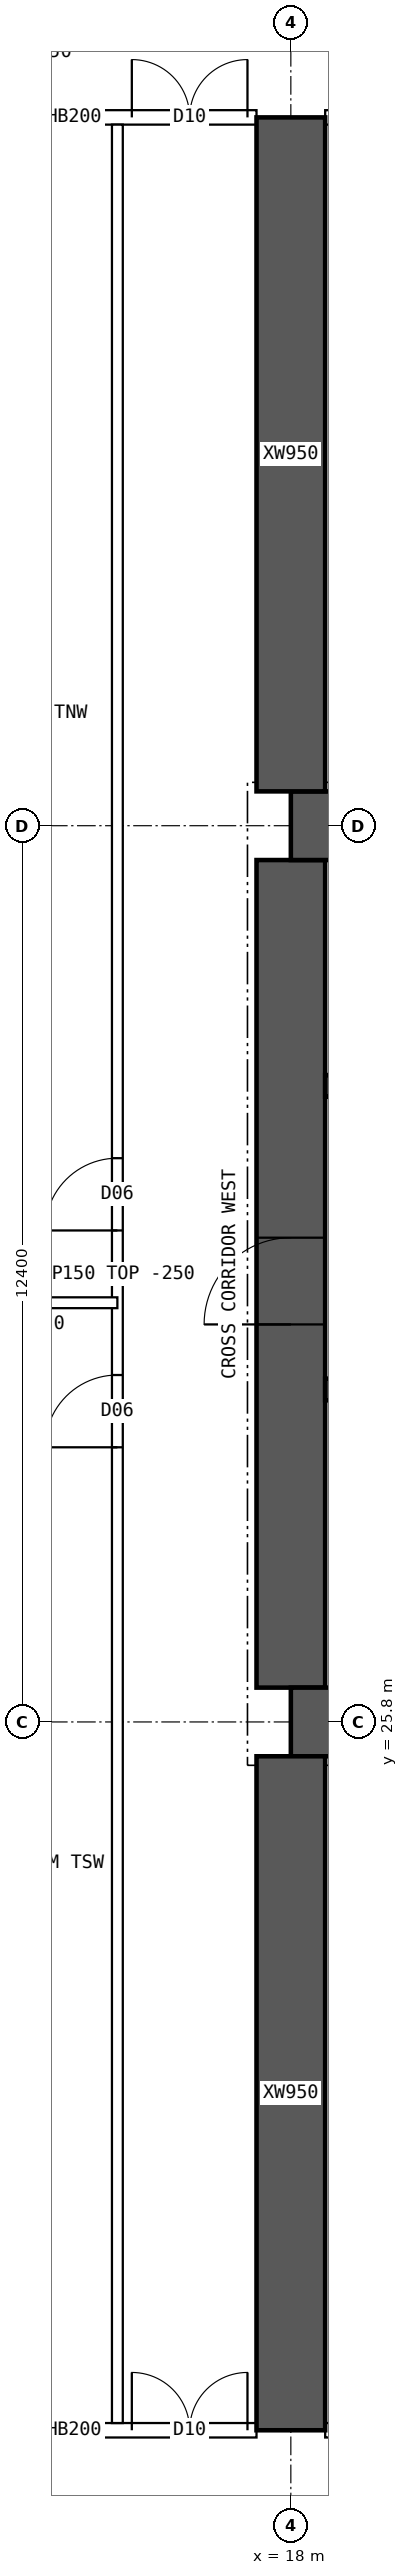
"""IFC4 building model, lengths in metres.
Left out: names, types, materials, properties, quantities, classifications, styles, units other than length and angle.
Written with IfcOpenShell. Run it as: python <this file> out.ifc"""

import sys

from ifc_helpers import new_model, si_unit, direction, frame, frame_2d, origin, place, context, subcontext, project, spatial, rectangle, extrude, element, fill, save


model = new_model("IFC4")
c1 = context("Model", 3, precision=1e-05, world=origin(), true_north=direction((0.0, 1.0)))
c2 = subcontext(c1, "Body", "Model", "MODEL_VIEW")
j1 = project(units=[si_unit("LENGTHUNIT", "METRE"), si_unit("PLANEANGLEUNIT", "RADIAN")], contexts=[c1])
p1 = place(None, origin())
s1 = spatial("IfcSite", under=j1, at=p1, CompositionType="ELEMENT")
p2 = place(p1, origin())
s2 = spatial("IfcBuilding", under=s1, at=p2, CompositionType="ELEMENT")
p3 = place(p2, frame((0.0, 0.0, 106.9)))
s3 = spatial("IfcBuildingStorey", under=s2, at=p3, CompositionType="ELEMENT", Elevation=106.9)
for number, where, z_axis, x_axis in (
    (1, (18.0, 25.8, 0.0), (0.0, 0.0, 1.0), (1.0, 0.0, 0.0)),
    (2, (18.0, 38.2, 0.0), (0.0, 0.0, 1.0), (1.0, 0.0, 0.0)),
):
    element("IfcWall", number, at=place(p3, frame(where, z_axis=z_axis, x_axis=x_axis)), inside=s3, PredefinedType="SHEAR", context=c2, shape_type="SweptSolid", body=[
        extrude(rectangle(XDim=48.0, YDim=0.95, at=frame_2d((24.0, 0.0))), origin(), (0.0, 0.0, 1.0), 3.75),
    ])
p4 = place(p3, frame((18.0, 26.275, 0.0), z_axis=(0.0, 0.0, 1.0), x_axis=(0.0, 1.0, 0.0)))
e3 = element("IfcWall", 3, at=p4, inside=s3, PredefinedType="SHEAR", context=c2, shape_type="SweptSolid", body=[
    extrude(rectangle(XDim=11.45, YDim=0.95, at=frame_2d((5.725, 0.0))), origin(), (0.0, 0.0, 1.0), 3.75),
])
p5 = place(p4, frame((5.025, 0.0, 0.0)))
e4 = element("IfcOpeningElement", 4, at=p5, cuts=e3, PredefinedType="OPENING", context=c2, shape_type="SweptSolid", body=[
    extrude(rectangle(XDim=1.2, YDim=2.1, at=frame_2d((0.6, 1.05))), frame((0.0, 0.485, 0.0), z_axis=(0.0, -1.0, 0.0), x_axis=(1.0, 0.0, 0.0)), (0.0, 0.0, 1.0), 0.97),
])
p6 = place(p3, frame((18.475, 30.4, 0.0), z_axis=(0.0, 0.0, 1.0), x_axis=(1.0, 0.0, 0.0)))
e5 = element("IfcWall", 5, at=p6, inside=s3, PredefinedType="SHEAR", context=c2, shape_type="SweptSolid", body=[
    extrude(rectangle(XDim=47.05, YDim=0.3, at=frame_2d((23.525, 0.0))), origin(), (0.0, 0.0, 1.0), 3.75),
])
p7 = place(p6, frame((0.4, 0.0, 0.0)))
e6 = element("IfcOpeningElement", 6, at=p7, cuts=e5, PredefinedType="OPENING", context=c2, shape_type="SweptSolid", body=[
    extrude(rectangle(XDim=1.0, YDim=2.1, at=frame_2d((0.5, 1.05))), frame((0.0, 0.16, 0.0), z_axis=(0.0, -1.0, 0.0), x_axis=(1.0, 0.0, 0.0)), (0.0, 0.0, 1.0), 0.32),
])
p8 = place(p6, frame((45.65, 0.0, 0.0)))
e7 = element("IfcOpeningElement", 7, at=p8, cuts=e5, PredefinedType="OPENING", context=c2, shape_type="SweptSolid", body=[
    extrude(rectangle(XDim=1.0, YDim=2.1, at=frame_2d((0.5, 1.05))), frame((0.0, 0.16, 0.0), z_axis=(0.0, -1.0, 0.0), x_axis=(1.0, 0.0, 0.0)), (0.0, 0.0, 1.0), 0.32),
])
p9 = place(p6, frame((8.275, 0.0, 0.0)))
e8 = element("IfcOpeningElement", 8, at=p9, cuts=e5, PredefinedType="OPENING", context=c2, shape_type="SweptSolid", body=[
    extrude(rectangle(XDim=1.1, YDim=2.1, at=frame_2d((0.55, 1.05))), frame((0.0, 0.16, 0.0), z_axis=(0.0, -1.0, 0.0), x_axis=(1.0, 0.0, 0.0)), (0.0, 0.0, 1.0), 0.32),
])
p10 = place(p6, frame((10.875, 0.0, 0.0)))
e9 = element("IfcOpeningElement", 9, at=p10, cuts=e5, PredefinedType="OPENING", context=c2, shape_type="SweptSolid", body=[
    extrude(rectangle(XDim=1.1, YDim=2.1, at=frame_2d((0.55, 1.05))), frame((0.0, 0.16, 0.0), z_axis=(0.0, -1.0, 0.0), x_axis=(1.0, 0.0, 0.0)), (0.0, 0.0, 1.0), 0.32),
])
p11 = place(p6, frame((13.475, 0.0, 0.0)))
e10 = element("IfcOpeningElement", 10, at=p11, cuts=e5, PredefinedType="OPENING", context=c2, shape_type="SweptSolid", body=[
    extrude(rectangle(XDim=1.1, YDim=2.1, at=frame_2d((0.55, 1.05))), frame((0.0, 0.16, 0.0), z_axis=(0.0, -1.0, 0.0), x_axis=(1.0, 0.0, 0.0)), (0.0, 0.0, 1.0), 0.32),
])
p12 = place(p6, frame((16.075, 0.0, 0.0)))
e11 = element("IfcOpeningElement", 11, at=p12, cuts=e5, PredefinedType="OPENING", context=c2, shape_type="SweptSolid", body=[
    extrude(rectangle(XDim=1.1, YDim=2.1, at=frame_2d((0.55, 1.05))), frame((0.0, 0.16, 0.0), z_axis=(0.0, -1.0, 0.0), x_axis=(1.0, 0.0, 0.0)), (0.0, 0.0, 1.0), 0.32),
])
p13 = place(p6, frame((18.85, 0.0, 0.0)))
e12 = element("IfcOpeningElement", 12, at=p13, cuts=e5, PredefinedType="OPENING", context=c2, shape_type="SweptSolid", body=[
    extrude(rectangle(XDim=0.9, YDim=2.1, at=frame_2d((0.45, 1.05))), frame((0.0, 0.16, 0.0), z_axis=(0.0, -1.0, 0.0), x_axis=(1.0, 0.0, 0.0)), (0.0, 0.0, 1.0), 0.32),
])
p14 = place(p6, frame((30.142, 0.0, 0.0)))
e13 = element("IfcOpeningElement", 13, at=p14, cuts=e5, PredefinedType="OPENING", context=c2, shape_type="SweptSolid", body=[
    extrude(rectangle(XDim=1.1, YDim=2.1, at=frame_2d((0.55, 1.05))), frame((0.0, 0.16, 0.0), z_axis=(0.0, -1.0, 0.0), x_axis=(1.0, 0.0, 0.0)), (0.0, 0.0, 1.0), 0.32),
])
p15 = place(p6, frame((33.675, 0.0, 0.0)))
e14 = element("IfcOpeningElement", 14, at=p15, cuts=e5, PredefinedType="OPENING", context=c2, shape_type="SweptSolid", body=[
    extrude(rectangle(XDim=1.1, YDim=2.1, at=frame_2d((0.55, 1.05))), frame((0.0, 0.16, 0.0), z_axis=(0.0, -1.0, 0.0), x_axis=(1.0, 0.0, 0.0)), (0.0, 0.0, 1.0), 0.32),
])
p16 = place(p6, frame((37.208, 0.0, 0.0)))
e15 = element("IfcOpeningElement", 15, at=p16, cuts=e5, PredefinedType="OPENING", context=c2, shape_type="SweptSolid", body=[
    extrude(rectangle(XDim=1.1, YDim=2.1, at=frame_2d((0.55, 1.05))), frame((0.0, 0.16, 0.0), z_axis=(0.0, -1.0, 0.0), x_axis=(1.0, 0.0, 0.0)), (0.0, 0.0, 1.0), 0.32),
])
p17 = place(p3, frame((18.475, 34.6, 0.0), z_axis=(0.0, 0.0, 1.0), x_axis=(1.0, 0.0, 0.0)))
e16 = element("IfcWall", 16, at=p17, inside=s3, PredefinedType="SHEAR", context=c2, shape_type="SweptSolid", body=[
    extrude(rectangle(XDim=47.05, YDim=0.3, at=frame_2d((23.525, 0.0))), origin(), (0.0, 0.0, 1.0), 3.75),
])
p18 = place(p17, frame((0.9, 0.0, 0.0)))
e17 = element("IfcOpeningElement", 17, at=p18, cuts=e16, PredefinedType="OPENING", context=c2, shape_type="SweptSolid", body=[
    extrude(rectangle(XDim=1.1, YDim=2.1, at=frame_2d((0.55, 1.05))), frame((0.0, 0.16, 0.0), z_axis=(0.0, -1.0, 0.0), x_axis=(1.0, 0.0, 0.0)), (0.0, 0.0, 1.0), 0.32),
])
p19 = place(p17, frame((45.05, 0.0, 0.0)))
e18 = element("IfcOpeningElement", 18, at=p19, cuts=e16, PredefinedType="OPENING", context=c2, shape_type="SweptSolid", body=[
    extrude(rectangle(XDim=1.1, YDim=2.1, at=frame_2d((0.55, 1.05))), frame((0.0, 0.16, 0.0), z_axis=(0.0, -1.0, 0.0), x_axis=(1.0, 0.0, 0.0)), (0.0, 0.0, 1.0), 0.32),
])
p20 = place(p17, frame((4.125, 0.0, 0.0)))
e19 = element("IfcOpeningElement", 19, at=p20, cuts=e16, PredefinedType="OPENING", context=c2, shape_type="SweptSolid", body=[
    extrude(rectangle(XDim=0.9, YDim=2.1, at=frame_2d((0.45, 1.05))), frame((0.0, 0.16, 0.0), z_axis=(0.0, -1.0, 0.0), x_axis=(1.0, 0.0, 0.0)), (0.0, 0.0, 1.0), 0.32),
])
p21 = place(p17, frame((42.025, 0.0, 0.0)))
e20 = element("IfcOpeningElement", 20, at=p21, cuts=e16, PredefinedType="OPENING", context=c2, shape_type="SweptSolid", body=[
    extrude(rectangle(XDim=0.9, YDim=2.1, at=frame_2d((0.45, 1.05))), frame((0.0, 0.16, 0.0), z_axis=(0.0, -1.0, 0.0), x_axis=(1.0, 0.0, 0.0)), (0.0, 0.0, 1.0), 0.32),
])
p22 = place(p17, frame((8.9, 0.0, 0.0)))
e21 = element("IfcOpeningElement", 21, at=p22, cuts=e16, PredefinedType="OPENING", context=c2, shape_type="SweptSolid", body=[
    extrude(rectangle(XDim=0.9, YDim=2.1, at=frame_2d((0.45, 1.05))), frame((0.0, 0.16, 0.0), z_axis=(0.0, -1.0, 0.0), x_axis=(1.0, 0.0, 0.0)), (0.0, 0.0, 1.0), 0.32),
])
p23 = place(p17, frame((12.874, 0.0, 0.0)))
e22 = element("IfcOpeningElement", 22, at=p23, cuts=e16, PredefinedType="OPENING", context=c2, shape_type="SweptSolid", body=[
    extrude(rectangle(XDim=0.9, YDim=2.1, at=frame_2d((0.45, 1.05))), frame((0.0, 0.16, 0.0), z_axis=(0.0, -1.0, 0.0), x_axis=(1.0, 0.0, 0.0)), (0.0, 0.0, 1.0), 0.32),
])
p24 = place(p17, frame((16.521, 0.0, 0.0)))
e23 = element("IfcOpeningElement", 23, at=p24, cuts=e16, PredefinedType="OPENING", context=c2, shape_type="SweptSolid", body=[
    extrude(rectangle(XDim=0.9, YDim=2.1, at=frame_2d((0.45, 1.05))), frame((0.0, 0.16, 0.0), z_axis=(0.0, -1.0, 0.0), x_axis=(1.0, 0.0, 0.0)), (0.0, 0.0, 1.0), 0.32),
])
p25 = place(p17, frame((20.28, 0.0, 0.0)))
e24 = element("IfcOpeningElement", 24, at=p25, cuts=e16, PredefinedType="OPENING", context=c2, shape_type="SweptSolid", body=[
    extrude(rectangle(XDim=0.9, YDim=2.1, at=frame_2d((0.45, 1.05))), frame((0.0, 0.16, 0.0), z_axis=(0.0, -1.0, 0.0), x_axis=(1.0, 0.0, 0.0)), (0.0, 0.0, 1.0), 0.32),
])
p26 = place(p17, frame((24.686, 0.0, 0.0)))
e25 = element("IfcOpeningElement", 25, at=p26, cuts=e16, PredefinedType="OPENING", context=c2, shape_type="SweptSolid", body=[
    extrude(rectangle(XDim=0.9, YDim=2.1, at=frame_2d((0.45, 1.05))), frame((0.0, 0.16, 0.0), z_axis=(0.0, -1.0, 0.0), x_axis=(1.0, 0.0, 0.0)), (0.0, 0.0, 1.0), 0.32),
])
p27 = place(p17, frame((27.483, 0.0, 0.0)))
e26 = element("IfcOpeningElement", 26, at=p27, cuts=e16, PredefinedType="OPENING", context=c2, shape_type="SweptSolid", body=[
    extrude(rectangle(XDim=0.9, YDim=2.1, at=frame_2d((0.45, 1.05))), frame((0.0, 0.16, 0.0), z_axis=(0.0, -1.0, 0.0), x_axis=(1.0, 0.0, 0.0)), (0.0, 0.0, 1.0), 0.32),
])
p28 = place(p17, frame((29.856, 0.0, 0.0)))
e27 = element("IfcOpeningElement", 27, at=p28, cuts=e16, PredefinedType="OPENING", context=c2, shape_type="SweptSolid", body=[
    extrude(rectangle(XDim=0.9, YDim=2.1, at=frame_2d((0.45, 1.05))), frame((0.0, 0.16, 0.0), z_axis=(0.0, -1.0, 0.0), x_axis=(1.0, 0.0, 0.0)), (0.0, 0.0, 1.0), 0.32),
])
p29 = place(p17, frame((35.326, 0.0, 0.0)))
e28 = element("IfcOpeningElement", 28, at=p29, cuts=e16, PredefinedType="OPENING", context=c2, shape_type="SweptSolid", body=[
    extrude(rectangle(XDim=0.9, YDim=2.1, at=frame_2d((0.45, 1.05))), frame((0.0, 0.16, 0.0), z_axis=(0.0, -1.0, 0.0), x_axis=(1.0, 0.0, 0.0)), (0.0, 0.0, 1.0), 0.32),
])
for number, where, z_axis, x_axis in (
    (29, (18.0, 16.0, 0.0), (0.0, 0.0, 1.0), (0.0, 1.0, 0.0)),
    (30, (18.0, 38.675, 0.0), (0.0, 0.0, 1.0), (0.0, 1.0, 0.0)),
):
    element("IfcWall", number, at=place(p3, frame(where, z_axis=z_axis, x_axis=x_axis)), inside=s3, PredefinedType="SHEAR", context=c2, shape_type="SweptSolid", body=[
        extrude(rectangle(XDim=9.325, YDim=0.95, at=frame_2d((4.663, 0.0))), origin(), (0.0, 0.0, 1.0), 3.75),
    ])
p30 = place(p3, frame((12.475, 16.0, 0.0), z_axis=(0.0, 0.0, 1.0), x_axis=(1.0, 0.0, 0.0)))
e31 = element("IfcWall", 31, at=p30, inside=s3, PredefinedType="SOLIDWALL", context=c2, shape_type="SweptSolid", body=[
    extrude(rectangle(XDim=5.05, YDim=0.2, at=frame_2d((2.525, 0.0))), origin(), (0.0, 0.0, 1.0), 3.5),
])
p31 = place(p30, frame((3.325, 0.0, 0.0)))
e32 = element("IfcOpeningElement", 32, at=p31, cuts=e31, PredefinedType="OPENING", context=c2, shape_type="SweptSolid", body=[
    extrude(rectangle(XDim=1.6, YDim=2.1, at=frame_2d((0.8, 1.05))), frame((0.0, 0.11, 0.0), z_axis=(0.0, -1.0, 0.0), x_axis=(1.0, 0.0, 0.0)), (0.0, 0.0, 1.0), 0.22),
])
p32 = place(p3, frame((18.475, 16.0, 0.0), z_axis=(0.0, 0.0, 1.0), x_axis=(1.0, 0.0, 0.0)))
e33 = element("IfcWall", 33, at=p32, inside=s3, PredefinedType="SOLIDWALL", context=c2, shape_type="SweptSolid", body=[
    extrude(rectangle(XDim=5.05, YDim=0.2, at=frame_2d((2.525, 0.0))), origin(), (0.0, 0.0, 1.0), 3.5),
])
p33 = place(p32, frame((0.8, 0.0, 0.0)))
e34 = element("IfcOpeningElement", 34, at=p33, cuts=e33, PredefinedType="OPENING", context=c2, shape_type="SweptSolid", body=[
    extrude(rectangle(XDim=1.0, YDim=2.1, at=frame_2d((0.5, 1.05))), frame((0.0, 0.11, 0.0), z_axis=(0.0, -1.0, 0.0), x_axis=(1.0, 0.0, 0.0)), (0.0, 0.0, 1.0), 0.22),
])
p34 = place(p3, frame((12.475, 48.0, 0.0), z_axis=(0.0, 0.0, 1.0), x_axis=(1.0, 0.0, 0.0)))
e35 = element("IfcWall", 35, at=p34, inside=s3, PredefinedType="SOLIDWALL", context=c2, shape_type="SweptSolid", body=[
    extrude(rectangle(XDim=5.05, YDim=0.2, at=frame_2d((2.525, 0.0))), origin(), (0.0, 0.0, 1.0), 3.5),
])
p35 = place(p34, frame((3.325, 0.0, 0.0)))
e36 = element("IfcOpeningElement", 36, at=p35, cuts=e35, PredefinedType="OPENING", context=c2, shape_type="SweptSolid", body=[
    extrude(rectangle(XDim=1.6, YDim=2.1, at=frame_2d((0.8, 1.05))), frame((0.0, 0.11, 0.0), z_axis=(0.0, -1.0, 0.0), x_axis=(1.0, 0.0, 0.0)), (0.0, 0.0, 1.0), 0.22),
])
p36 = place(p3, frame((18.475, 48.0, 0.0), z_axis=(0.0, 0.0, 1.0), x_axis=(1.0, 0.0, 0.0)))
e37 = element("IfcWall", 37, at=p36, inside=s3, PredefinedType="SOLIDWALL", context=c2, shape_type="SweptSolid", body=[
    extrude(rectangle(XDim=5.05, YDim=0.2, at=frame_2d((2.525, 0.0))), origin(), (0.0, 0.0, 1.0), 3.5),
])
p37 = place(p36, frame((0.8, 0.0, 0.0)))
e38 = element("IfcOpeningElement", 38, at=p37, cuts=e37, PredefinedType="OPENING", context=c2, shape_type="SweptSolid", body=[
    extrude(rectangle(XDim=1.0, YDim=2.1, at=frame_2d((0.5, 1.05))), frame((0.0, 0.11, 0.0), z_axis=(0.0, -1.0, 0.0), x_axis=(1.0, 0.0, 0.0)), (0.0, 0.0, 1.0), 0.22),
])
p38 = place(p3, frame((15.6, 16.1, 0.0), z_axis=(0.0, 0.0, 1.0), x_axis=(0.0, 1.0, 0.0)))
e39 = element("IfcWall", 39, at=p38, inside=s3, PredefinedType="PARTITIONING", context=c2, shape_type="SweptSolid", body=[
    extrude(rectangle(XDim=31.8, YDim=0.15, at=frame_2d((15.9, 0.0))), origin(), (0.0, 0.0, 1.0), 3.5),
])
p39 = place(p38, frame((13.5, 0.0, 0.0)))
e40 = element("IfcOpeningElement", 40, at=p39, cuts=e39, PredefinedType="OPENING", context=c2, shape_type="SweptSolid", body=[
    extrude(rectangle(XDim=1.0, YDim=2.1, at=frame_2d((0.5, 1.05))), frame((0.0, 0.085, 0.0), z_axis=(0.0, -1.0, 0.0), x_axis=(1.0, 0.0, 0.0)), (0.0, 0.0, 1.0), 0.17),
])
p40 = place(p38, frame((16.5, 0.0, 0.0)))
e41 = element("IfcOpeningElement", 41, at=p40, cuts=e39, PredefinedType="OPENING", context=c2, shape_type="SweptSolid", body=[
    extrude(rectangle(XDim=1.0, YDim=2.1, at=frame_2d((0.5, 1.05))), frame((0.0, 0.085, 0.0), z_axis=(0.0, -1.0, 0.0), x_axis=(1.0, 0.0, 0.0)), (0.0, 0.0, 1.0), 0.17),
])
p41 = place(p3, frame((12.0, 31.6, 0.0), z_axis=(0.0, 0.0, 1.0), x_axis=(1.0, 0.0, 0.0)))
e42 = element("IfcWall", 42, at=p41, inside=s3, PredefinedType="PARTITIONING", context=c2, shape_type="SweptSolid", body=[
    extrude(rectangle(XDim=3.6, YDim=0.15, at=frame_2d((1.8, 0.0))), origin(), (0.0, 0.0, 1.0), 3.5),
])
p42 = place(p5, origin())
e43 = element("IfcDoor", 43, at=p42, inside=s3, OperationType="SINGLE_SWING_LEFT", PredefinedType="DOOR", context=c2, shape_type="SweptSolid", body=[
    extrude(rectangle(XDim=1.2, YDim=2.1, at=frame_2d((0.6, 1.05))), frame((0.0, 0.025, 0.0), z_axis=(0.0, -1.0, 0.0), x_axis=(1.0, 0.0, 0.0)), (0.0, 0.0, 1.0), 0.05),
])
fill(e4, e43)
p43 = place(p31, origin())
e44 = element("IfcDoor", 44, at=p43, inside=s3, OperationType="DOUBLE_DOOR_SINGLE_SWING", PredefinedType="DOOR", context=c2, shape_type="SweptSolid", body=[
    extrude(rectangle(XDim=1.6, YDim=2.1, at=frame_2d((0.8, 1.05))), frame((0.0, 0.025, 0.0), z_axis=(0.0, -1.0, 0.0), x_axis=(1.0, 0.0, 0.0)), (0.0, 0.0, 1.0), 0.05),
])
fill(e32, e44)
p44 = place(p35, origin())
e45 = element("IfcDoor", 45, at=p44, inside=s3, OperationType="DOUBLE_DOOR_SINGLE_SWING", PredefinedType="DOOR", context=c2, shape_type="SweptSolid", body=[
    extrude(rectangle(XDim=1.6, YDim=2.1, at=frame_2d((0.8, 1.05))), frame((0.0, 0.025, 0.0), z_axis=(0.0, -1.0, 0.0), x_axis=(1.0, 0.0, 0.0)), (0.0, 0.0, 1.0), 0.05),
])
fill(e36, e45)
p45 = place(p39, origin())
e46 = element("IfcDoor", 46, at=p45, inside=s3, OperationType="SINGLE_SWING_LEFT", PredefinedType="DOOR", context=c2, shape_type="SweptSolid", body=[
    extrude(rectangle(XDim=1.0, YDim=2.1, at=frame_2d((0.5, 1.05))), frame((0.0, 0.025, 0.0), z_axis=(0.0, -1.0, 0.0), x_axis=(1.0, 0.0, 0.0)), (0.0, 0.0, 1.0), 0.05),
])
fill(e40, e46)
p46 = place(p40, origin())
e47 = element("IfcDoor", 47, at=p46, inside=s3, OperationType="SINGLE_SWING_LEFT", PredefinedType="DOOR", context=c2, shape_type="SweptSolid", body=[
    extrude(rectangle(XDim=1.0, YDim=2.1, at=frame_2d((0.5, 1.05))), frame((0.0, 0.025, 0.0), z_axis=(0.0, -1.0, 0.0), x_axis=(1.0, 0.0, 0.0)), (0.0, 0.0, 1.0), 0.05),
])
fill(e41, e47)
save(model, sys.argv[1])
